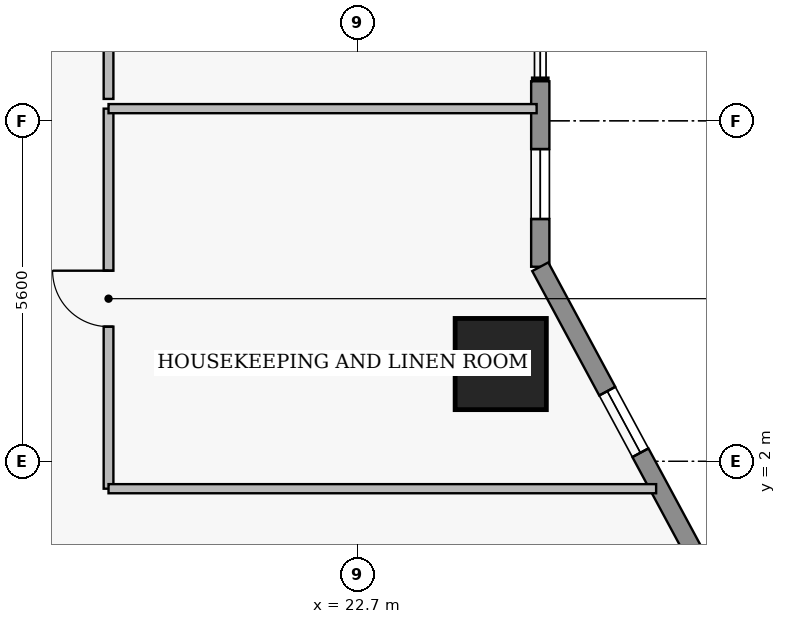
"""IFC4 building model, lengths in metres.
Left out: names, types, materials, properties, quantities, classifications, styles, units other than length and angle.
Written with IfcOpenShell. Run it as: python <this file> out.ifc"""

import sys

from ifc_helpers import new_model, si_unit, direction, frame, frame_2d, origin, origin_2d, place, context, subcontext, project, spatial, rectangle, extrude, element, fill, save


model = new_model("IFC4")
c1 = context("Model", 3, precision=1e-05, world=origin(), true_north=direction((0.0, 1.0)))
c2 = subcontext(c1, "Body", "Model", "MODEL_VIEW")
j1 = project(units=[si_unit("LENGTHUNIT", "METRE"), si_unit("PLANEANGLEUNIT", "RADIAN")], contexts=[c1])
p1 = place(None, origin())
s1 = spatial("IfcSite", under=j1, at=p1, CompositionType="ELEMENT")
p2 = place(p1, origin())
s2 = spatial("IfcBuilding", under=s1, at=p2, CompositionType="ELEMENT")
p3 = place(p2, frame((0.0, 0.0, 49.5)))
s3 = spatial("IfcBuildingStorey", under=s2, at=p3, CompositionType="ELEMENT", Elevation=49.5)
p4 = place(p3, frame((25.05, 3.6, 0.0), z_axis=(0.0, 0.0, 1.0), x_axis=(1.0, 0.0, 0.0)))
e1 = element("IfcColumn", 1, at=p4, inside=s3, PredefinedType="COLUMN", context=c2, shape_type="SweptSolid", body=[
    extrude(rectangle(XDim=1.5, YDim=1.5, at=origin_2d()), origin(), (0.0, 0.0, 1.0), 3.65),
])
p5 = place(p3, frame((25.7, 8.25, 0.0), z_axis=(0.0, 0.0, 1.0), x_axis=(0.0, -1.0, 0.0)))
e2 = element("IfcWall", 2, at=p5, inside=s3, PredefinedType="STANDARD", context=c2, shape_type="SweptSolid", body=[
    extrude(rectangle(XDim=3.05, YDim=0.3, at=frame_2d((1.525, 0.0))), origin(), (0.0, 0.0, 1.0), 3.43),
])
p6 = place(p5, frame((1.115, 0.0, 0.95)))
e3 = element("IfcOpeningElement", 3, at=p6, cuts=e2, PredefinedType="OPENING", context=c2, shape_type="SweptSolid", body=[
    extrude(rectangle(XDim=1.15, YDim=1.55, at=frame_2d((0.575, 0.775))), frame((0.0, 0.16, 0.0), z_axis=(0.0, -1.0, 0.0), x_axis=(1.0, 0.0, 0.0)), (0.0, 0.0, 1.0), 0.32),
])
p7 = place(p3, frame((25.7, 5.2, 0.0), z_axis=(0.0, 0.0, 1.0), x_axis=(0.474109683532, -0.880465790352, 0.0)))
e4 = element("IfcWall", 4, at=p7, inside=s3, PredefinedType="STANDARD", context=c2, shape_type="SweptSolid", body=[
    extrude(rectangle(XDim=5.906, YDim=0.3, at=frame_2d((2.953, 0.0))), origin(), (0.0, 0.0, 1.0), 3.43),
])
p8 = place(p7, frame((2.324, 0.0, 0.95)))
e5 = element("IfcOpeningElement", 5, at=p8, cuts=e4, PredefinedType="OPENING", context=c2, shape_type="SweptSolid", body=[
    extrude(rectangle(XDim=1.15, YDim=1.55, at=frame_2d((0.575, 0.775))), frame((0.0, 0.16, 0.0), z_axis=(0.0, -1.0, 0.0), x_axis=(1.0, 0.0, 0.0)), (0.0, 0.0, 1.0), 0.32),
])
p9 = place(p3, frame((18.6, 1.55, 0.0), z_axis=(0.0, 0.0, 1.0), x_axis=(0.0, 1.0, 0.0)))
e6 = element("IfcWall", 6, at=p9, inside=s3, PredefinedType="PARTITIONING", context=c2, shape_type="SweptSolid", body=[
    extrude(rectangle(XDim=6.25, YDim=0.16, at=frame_2d((3.125, 0.0))), origin(), (0.0, 0.0, 1.0), 3.43),
])
p10 = place(p9, frame((2.665, 0.0, 0.0)))
e7 = element("IfcOpeningElement", 7, at=p10, cuts=e6, PredefinedType="OPENING", context=c2, shape_type="SweptSolid", body=[
    extrude(rectangle(XDim=0.92, YDim=2.12, at=frame_2d((0.46, 1.06))), frame((0.0, 0.09, 0.0), z_axis=(0.0, -1.0, 0.0), x_axis=(1.0, 0.0, 0.0)), (0.0, 0.0, 1.0), 0.18),
])
p11 = place(p3, frame((18.6, 7.96, 0.0), z_axis=(0.0, 0.0, 1.0), x_axis=(0.0, 1.0, 0.0)))
e8 = element("IfcWall", 8, at=p11, inside=s3, PredefinedType="PARTITIONING", context=c2, shape_type="SweptSolid", body=[
    extrude(rectangle(XDim=6.89, YDim=0.16, at=frame_2d((3.445, 0.0))), origin(), (0.0, 0.0, 1.0), 3.43),
])
p12 = place(p11, frame((2.985, 0.0, 0.0)))
e9 = element("IfcOpeningElement", 9, at=p12, cuts=e8, PredefinedType="OPENING", context=c2, shape_type="SweptSolid", body=[
    extrude(rectangle(XDim=0.92, YDim=2.12, at=frame_2d((0.46, 1.06))), frame((0.0, 0.09, 0.0), z_axis=(0.0, -1.0, 0.0), x_axis=(1.0, 0.0, 0.0)), (0.0, 0.0, 1.0), 0.18),
])
p13 = place(p3, frame((18.6, 1.55, 0.0), z_axis=(0.0, 0.0, 1.0), x_axis=(1.0, 0.0, 0.0)))
e10 = element("IfcWall", 10, at=p13, inside=s3, PredefinedType="PARTITIONING", context=c2, shape_type="SweptSolid", body=[
    extrude(rectangle(XDim=9.005, YDim=0.15, at=frame_2d((4.503, 0.0))), origin(), (0.0, 0.0, 1.0), 3.43),
])
p14 = place(p3, frame((18.6, 7.8, 0.0), z_axis=(0.0, 0.0, 1.0), x_axis=(1.0, 0.0, 0.0)))
e11 = element("IfcWall", 11, at=p14, inside=s3, PredefinedType="PARTITIONING", context=c2, shape_type="SweptSolid", body=[
    extrude(rectangle(XDim=7.04, YDim=0.15, at=frame_2d((3.52, 0.0))), origin(), (0.0, 0.0, 1.0), 3.43),
])
p15 = place(p6, origin())
e12 = element("IfcWindow", 12, at=p15, inside=s3, PartitioningType="SINGLE_PANEL", PredefinedType="WINDOW", context=c2, shape_type="SweptSolid", body=[
    extrude(rectangle(XDim=1.15, YDim=1.55, at=frame_2d((0.575, 0.775))), frame((0.0, 0.03, 0.0), z_axis=(0.0, -1.0, 0.0), x_axis=(1.0, 0.0, 0.0)), (0.0, 0.0, 1.0), 0.06),
])
fill(e3, e12)
p16 = place(p8, origin())
e13 = element("IfcWindow", 13, at=p16, inside=s3, PartitioningType="SINGLE_PANEL", PredefinedType="WINDOW", context=c2, shape_type="SweptSolid", body=[
    extrude(rectangle(XDim=1.15, YDim=1.55, at=frame_2d((0.575, 0.775))), frame((0.0, 0.03, 0.0), z_axis=(0.0, -1.0, 0.0), x_axis=(1.0, 0.0, 0.0)), (0.0, 0.0, 1.0), 0.06),
])
fill(e5, e13)
p17 = place(p10, origin())
e14 = element("IfcDoor", 14, at=p17, inside=s3, OperationType="SINGLE_SWING_RIGHT", PredefinedType="DOOR", context=c2, shape_type="SweptSolid", body=[
    extrude(rectangle(XDim=0.92, YDim=2.12, at=frame_2d((0.46, 1.06))), frame((0.0, 0.025, 0.0), z_axis=(0.0, -1.0, 0.0), x_axis=(1.0, 0.0, 0.0)), (0.0, 0.0, 1.0), 0.05),
])
fill(e7, e14)
save(model, sys.argv[1])
